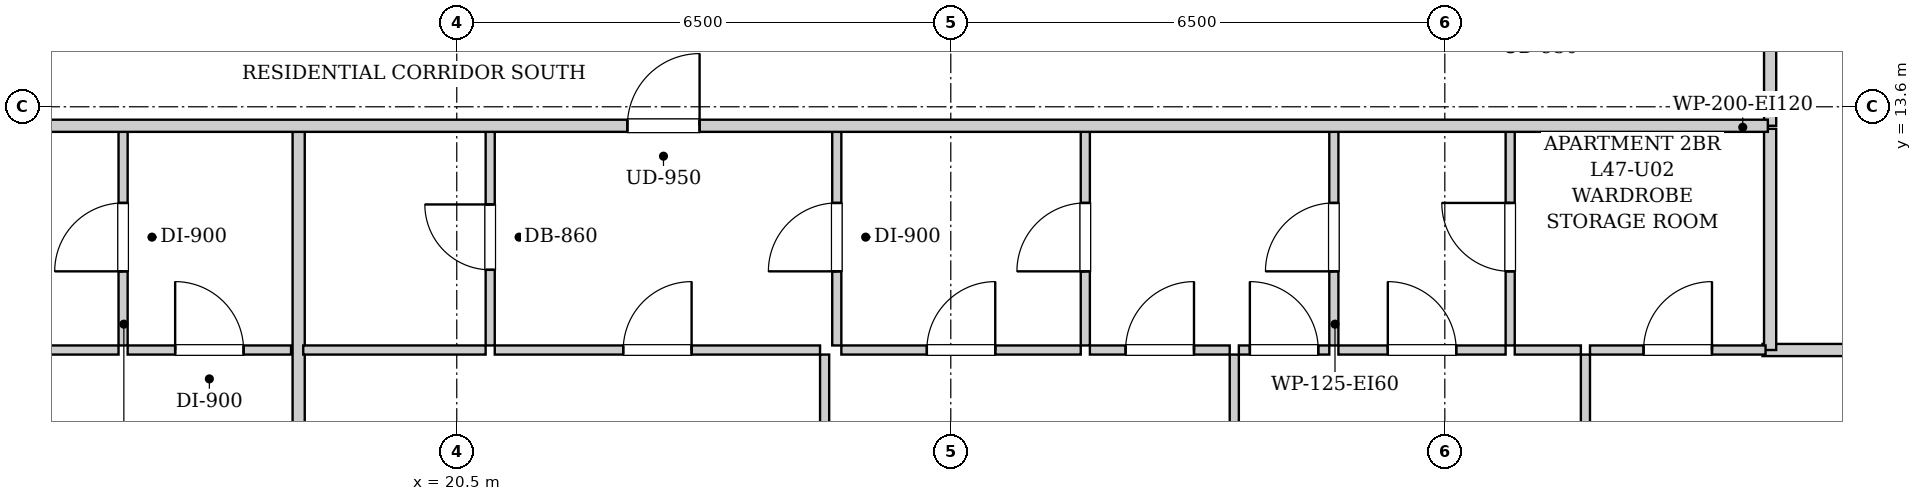
"""IFC4 building model, lengths in metres.
Left out: names, types, materials, properties, quantities, classifications, styles, units other than length and angle.
Written with IfcOpenShell. Run it as: python <this file> out.ifc"""

import sys

from ifc_helpers import new_model, si_unit, direction, frame, frame_2d, origin, place, context, subcontext, project, spatial, rectangle, extrude, element, fill, save


model = new_model("IFC4")
c1 = context("Model", 3, precision=1e-05, world=origin(), true_north=direction((0.0, 1.0)))
c2 = subcontext(c1, "Body", "Model", "MODEL_VIEW")
j1 = project(units=[si_unit("LENGTHUNIT", "METRE"), si_unit("PLANEANGLEUNIT", "RADIAN")], contexts=[c1])
p1 = place(None, origin())
s1 = spatial("IfcSite", under=j1, at=p1, CompositionType="ELEMENT")
p2 = place(p1, origin())
s2 = spatial("IfcBuilding", under=s1, at=p2, CompositionType="ELEMENT")
p3 = place(p2, frame((0.0, 0.0, 163.4)))
s3 = spatial("IfcBuildingStorey", under=s2, at=p3, CompositionType="ELEMENT", Elevation=163.4)
p4 = place(p3, frame((37.78, 13.35, 0.0), z_axis=(0.0, 0.0, 1.0), x_axis=(0.0, 1.0, 0.0)))
e1 = element("IfcWall", 1, at=p4, inside=s3, PredefinedType="PARTITIONING", context=c2, shape_type="SweptSolid", body=[
    extrude(rectangle(XDim=1.74, YDim=0.16, at=frame_2d((0.87, 0.0))), origin(), (0.0, 0.0, 1.0), 2.99),
])
p5 = place(p3, frame((16.11, 10.46, 0.0), z_axis=(0.0, 0.0, 1.0), x_axis=(0.0, 1.0, 0.0)))
e2 = element("IfcWall", 2, at=p5, inside=s3, PredefinedType="PARTITIONING", context=c2, shape_type="SweptSolid", body=[
    extrude(rectangle(XDim=2.85, YDim=0.12, at=frame_2d((1.425, 0.0))), origin(), (0.0, 0.0, 1.0), 2.99),
])
p6 = place(p5, frame((0.975, 0.0, 0.0)))
e3 = element("IfcOpeningElement", 3, at=p6, cuts=e2, PredefinedType="OPENING", context=c2, shape_type="SweptSolid", body=[
    extrude(rectangle(XDim=0.9, YDim=2.05, at=frame_2d((0.45, 1.025))), frame((0.0, 0.07, 0.0), z_axis=(0.0, -1.0, 0.0), x_axis=(1.0, 0.0, 0.0)), (0.0, 0.0, 1.0), 0.14),
])
p7 = place(p3, frame((12.6, 10.4, 0.0), z_axis=(0.0, 0.0, 1.0), x_axis=(1.0, 0.0, 0.0)))
e4 = element("IfcWall", 4, at=p7, inside=s3, PredefinedType="PARTITIONING", context=c2, shape_type="SweptSolid", body=[
    extrude(rectangle(XDim=3.45, YDim=0.12, at=frame_2d((1.725, 0.0))), origin(), (0.0, 0.0, 1.0), 2.99),
])
p8 = place(p7, frame((1.275, 0.0, 0.0)))
e5 = element("IfcOpeningElement", 5, at=p8, cuts=e4, PredefinedType="OPENING", context=c2, shape_type="SweptSolid", body=[
    extrude(rectangle(XDim=0.9, YDim=2.05, at=frame_2d((0.45, 1.025))), frame((0.0, 0.07, 0.0), z_axis=(0.0, -1.0, 0.0), x_axis=(1.0, 0.0, 0.0)), (0.0, 0.0, 1.0), 0.14),
])
p9 = place(p3, frame((16.17, 10.4, 0.0), z_axis=(0.0, 0.0, 1.0), x_axis=(1.0, 0.0, 0.0)))
e6 = element("IfcWall", 6, at=p9, inside=s3, PredefinedType="PARTITIONING", context=c2, shape_type="SweptSolid", body=[
    extrude(rectangle(XDim=2.15, YDim=0.12, at=frame_2d((1.075, 0.0))), origin(), (0.0, 0.0, 1.0), 2.99),
])
p10 = place(p9, frame((0.625, 0.0, 0.0)))
e7 = element("IfcOpeningElement", 7, at=p10, cuts=e6, PredefinedType="OPENING", context=c2, shape_type="SweptSolid", body=[
    extrude(rectangle(XDim=0.9, YDim=2.05, at=frame_2d((0.45, 1.025))), frame((0.0, 0.07, 0.0), z_axis=(0.0, -1.0, 0.0), x_axis=(1.0, 0.0, 0.0)), (0.0, 0.0, 1.0), 0.14),
])
p11 = place(p3, frame((37.68, 10.4, 0.0), z_axis=(0.0, 0.0, 1.0), x_axis=(1.0, 0.0, 0.0)))
e8 = element("IfcWall", 8, at=p11, inside=s3, PredefinedType="PARTITIONING", context=c2, shape_type="SweptSolid", body=[
    extrude(rectangle(XDim=2.34, YDim=0.16, at=frame_2d((1.17, 0.0))), origin(), (0.0, 0.0, 1.0), 2.99),
])
p12 = place(p3, frame((37.78, 10.4, 0.0), z_axis=(0.0, 0.0, 1.0), x_axis=(0.0, 1.0, 0.0)))
e9 = element("IfcWall", 9, at=p12, inside=s3, PredefinedType="PARTITIONING", context=c2, shape_type="SweptSolid", body=[
    extrude(rectangle(XDim=2.91, YDim=0.16, at=frame_2d((1.455, 0.0))), origin(), (0.0, 0.0, 1.0), 2.99),
])
p13 = place(p3, frame((18.42, 4.08, 0.0), z_axis=(0.0, 0.0, 1.0), x_axis=(0.0, 1.0, 0.0)))
e10 = element("IfcWall", 10, at=p13, inside=s3, PredefinedType="PARTITIONING", context=c2, shape_type="SweptSolid", body=[
    extrude(rectangle(XDim=9.23, YDim=0.16, at=frame_2d((4.615, 0.0))), origin(), (0.0, 0.0, 1.0), 2.99),
])
p14 = place(p3, frame((20.94, 10.46, 0.0), z_axis=(0.0, 0.0, 1.0), x_axis=(0.0, 1.0, 0.0)))
e11 = element("IfcWall", 11, at=p14, inside=s3, PredefinedType="PARTITIONING", context=c2, shape_type="SweptSolid", body=[
    extrude(rectangle(XDim=2.85, YDim=0.12, at=frame_2d((1.425, 0.0))), origin(), (0.0, 0.0, 1.0), 2.99),
])
p15 = place(p14, frame((0.995, 0.0, 0.0)))
e12 = element("IfcOpeningElement", 12, at=p15, cuts=e11, PredefinedType="OPENING", context=c2, shape_type="SweptSolid", body=[
    extrude(rectangle(XDim=0.86, YDim=2.05, at=frame_2d((0.43, 1.025))), frame((0.0, 0.07, 0.0), z_axis=(0.0, -1.0, 0.0), x_axis=(1.0, 0.0, 0.0)), (0.0, 0.0, 1.0), 0.14),
])
p16 = place(p3, frame((18.48, 10.4, 0.0), z_axis=(0.0, 0.0, 1.0), x_axis=(1.0, 0.0, 0.0)))
e13 = element("IfcWall", 13, at=p16, inside=s3, PredefinedType="PARTITIONING", context=c2, shape_type="SweptSolid", body=[
    extrude(rectangle(XDim=2.4, YDim=0.12, at=frame_2d((1.2, 0.0))), origin(), (0.0, 0.0, 1.0), 2.99),
])
p17 = place(p3, frame((25.5, 10.46, 0.0), z_axis=(0.0, 0.0, 1.0), x_axis=(0.0, 1.0, 0.0)))
e14 = element("IfcWall", 14, at=p17, inside=s3, PredefinedType="PARTITIONING", context=c2, shape_type="SweptSolid", body=[
    extrude(rectangle(XDim=2.85, YDim=0.12, at=frame_2d((1.425, 0.0))), origin(), (0.0, 0.0, 1.0), 2.99),
])
p18 = place(p17, frame((0.975, 0.0, 0.0)))
e15 = element("IfcOpeningElement", 15, at=p18, cuts=e14, PredefinedType="OPENING", context=c2, shape_type="SweptSolid", body=[
    extrude(rectangle(XDim=0.9, YDim=2.05, at=frame_2d((0.45, 1.025))), frame((0.0, 0.07, 0.0), z_axis=(0.0, -1.0, 0.0), x_axis=(1.0, 0.0, 0.0)), (0.0, 0.0, 1.0), 0.14),
])
p19 = place(p3, frame((21.0, 10.4, 0.0), z_axis=(0.0, 0.0, 1.0), x_axis=(1.0, 0.0, 0.0)))
e16 = element("IfcWall", 16, at=p19, inside=s3, PredefinedType="PARTITIONING", context=c2, shape_type="SweptSolid", body=[
    extrude(rectangle(XDim=4.28, YDim=0.12, at=frame_2d((2.14, 0.0))), origin(), (0.0, 0.0, 1.0), 2.99),
])
p20 = place(p19, frame((1.69, 0.0, 0.0)))
e17 = element("IfcOpeningElement", 17, at=p20, cuts=e16, PredefinedType="OPENING", context=c2, shape_type="SweptSolid", body=[
    extrude(rectangle(XDim=0.9, YDim=2.05, at=frame_2d((0.45, 1.025))), frame((0.0, 0.07, 0.0), z_axis=(0.0, -1.0, 0.0), x_axis=(1.0, 0.0, 0.0)), (0.0, 0.0, 1.0), 0.14),
])
p21 = place(p3, frame((28.77, 10.46, 0.0), z_axis=(0.0, 0.0, 1.0), x_axis=(0.0, 1.0, 0.0)))
e18 = element("IfcWall", 18, at=p21, inside=s3, PredefinedType="PARTITIONING", context=c2, shape_type="SweptSolid", body=[
    extrude(rectangle(XDim=2.85, YDim=0.12, at=frame_2d((1.425, 0.0))), origin(), (0.0, 0.0, 1.0), 2.99),
])
p22 = place(p21, frame((0.975, 0.0, 0.0)))
e19 = element("IfcOpeningElement", 19, at=p22, cuts=e18, PredefinedType="OPENING", context=c2, shape_type="SweptSolid", body=[
    extrude(rectangle(XDim=0.9, YDim=2.05, at=frame_2d((0.45, 1.025))), frame((0.0, 0.07, 0.0), z_axis=(0.0, -1.0, 0.0), x_axis=(1.0, 0.0, 0.0)), (0.0, 0.0, 1.0), 0.14),
])
p23 = place(p3, frame((25.56, 10.4, 0.0), z_axis=(0.0, 0.0, 1.0), x_axis=(1.0, 0.0, 0.0)))
e20 = element("IfcWall", 20, at=p23, inside=s3, PredefinedType="PARTITIONING", context=c2, shape_type="SweptSolid", body=[
    extrude(rectangle(XDim=3.15, YDim=0.12, at=frame_2d((1.575, 0.0))), origin(), (0.0, 0.0, 1.0), 2.99),
])
p24 = place(p23, frame((1.125, 0.0, 0.0)))
e21 = element("IfcOpeningElement", 21, at=p24, cuts=e20, PredefinedType="OPENING", context=c2, shape_type="SweptSolid", body=[
    extrude(rectangle(XDim=0.9, YDim=2.05, at=frame_2d((0.45, 1.025))), frame((0.0, 0.07, 0.0), z_axis=(0.0, -1.0, 0.0), x_axis=(1.0, 0.0, 0.0)), (0.0, 0.0, 1.0), 0.14),
])
p25 = place(p3, frame((32.04, 10.46, 0.0), z_axis=(0.0, 0.0, 1.0), x_axis=(0.0, 1.0, 0.0)))
e22 = element("IfcWall", 22, at=p25, inside=s3, PredefinedType="PARTITIONING", context=c2, shape_type="SweptSolid", body=[
    extrude(rectangle(XDim=2.85, YDim=0.12, at=frame_2d((1.425, 0.0))), origin(), (0.0, 0.0, 1.0), 2.99),
])
p26 = place(p25, frame((0.975, 0.0, 0.0)))
e23 = element("IfcOpeningElement", 23, at=p26, cuts=e22, PredefinedType="OPENING", context=c2, shape_type="SweptSolid", body=[
    extrude(rectangle(XDim=0.9, YDim=2.05, at=frame_2d((0.45, 1.025))), frame((0.0, 0.07, 0.0), z_axis=(0.0, -1.0, 0.0), x_axis=(1.0, 0.0, 0.0)), (0.0, 0.0, 1.0), 0.14),
])
p27 = place(p3, frame((28.83, 10.4, 0.0), z_axis=(0.0, 0.0, 1.0), x_axis=(1.0, 0.0, 0.0)))
e24 = element("IfcWall", 24, at=p27, inside=s3, PredefinedType="PARTITIONING", context=c2, shape_type="SweptSolid", body=[
    extrude(rectangle(XDim=1.84, YDim=0.12, at=frame_2d((0.92, 0.0))), origin(), (0.0, 0.0, 1.0), 2.99),
])
p28 = place(p27, frame((0.47, 0.0, 0.0)))
e25 = element("IfcOpeningElement", 25, at=p28, cuts=e24, PredefinedType="OPENING", context=c2, shape_type="SweptSolid", body=[
    extrude(rectangle(XDim=0.9, YDim=2.05, at=frame_2d((0.45, 1.025))), frame((0.0, 0.07, 0.0), z_axis=(0.0, -1.0, 0.0), x_axis=(1.0, 0.0, 0.0)), (0.0, 0.0, 1.0), 0.14),
])
p29 = place(p3, frame((30.79, 10.4, 0.0), z_axis=(0.0, 0.0, 1.0), x_axis=(1.0, 0.0, 0.0)))
e26 = element("IfcWall", 26, at=p29, inside=s3, PredefinedType="PARTITIONING", context=c2, shape_type="SweptSolid", body=[
    extrude(rectangle(XDim=1.19, YDim=0.12, at=frame_2d((0.595, 0.0))), origin(), (0.0, 0.0, 1.0), 2.99),
])
p30 = place(p29, frame((0.145, 0.0, 0.0)))
e27 = element("IfcOpeningElement", 27, at=p30, cuts=e26, PredefinedType="OPENING", context=c2, shape_type="SweptSolid", body=[
    extrude(rectangle(XDim=0.9, YDim=2.05, at=frame_2d((0.45, 1.025))), frame((0.0, 0.07, 0.0), z_axis=(0.0, -1.0, 0.0), x_axis=(1.0, 0.0, 0.0)), (0.0, 0.0, 1.0), 0.14),
])
p31 = place(p3, frame((34.36, 10.46, 0.0), z_axis=(0.0, 0.0, 1.0), x_axis=(0.0, 1.0, 0.0)))
e28 = element("IfcWall", 28, at=p31, inside=s3, PredefinedType="PARTITIONING", context=c2, shape_type="SweptSolid", body=[
    extrude(rectangle(XDim=2.85, YDim=0.12, at=frame_2d((1.425, 0.0))), origin(), (0.0, 0.0, 1.0), 2.99),
])
p32 = place(p31, frame((0.975, 0.0, 0.0)))
e29 = element("IfcOpeningElement", 29, at=p32, cuts=e28, PredefinedType="OPENING", context=c2, shape_type="SweptSolid", body=[
    extrude(rectangle(XDim=0.9, YDim=2.05, at=frame_2d((0.45, 1.025))), frame((0.0, 0.07, 0.0), z_axis=(0.0, -1.0, 0.0), x_axis=(1.0, 0.0, 0.0)), (0.0, 0.0, 1.0), 0.14),
])
p33 = place(p3, frame((32.1, 10.4, 0.0), z_axis=(0.0, 0.0, 1.0), x_axis=(1.0, 0.0, 0.0)))
e30 = element("IfcWall", 30, at=p33, inside=s3, PredefinedType="PARTITIONING", context=c2, shape_type="SweptSolid", body=[
    extrude(rectangle(XDim=2.2, YDim=0.12, at=frame_2d((1.1, 0.0))), origin(), (0.0, 0.0, 1.0), 2.99),
])
p34 = place(p33, frame((0.65, 0.0, 0.0)))
e31 = element("IfcOpeningElement", 31, at=p34, cuts=e30, PredefinedType="OPENING", context=c2, shape_type="SweptSolid", body=[
    extrude(rectangle(XDim=0.9, YDim=2.05, at=frame_2d((0.45, 1.025))), frame((0.0, 0.07, 0.0), z_axis=(0.0, -1.0, 0.0), x_axis=(1.0, 0.0, 0.0)), (0.0, 0.0, 1.0), 0.14),
])
p35 = place(p3, frame((34.42, 10.4, 0.0), z_axis=(0.0, 0.0, 1.0), x_axis=(1.0, 0.0, 0.0)))
e32 = element("IfcWall", 32, at=p35, inside=s3, PredefinedType="PARTITIONING", context=c2, shape_type="SweptSolid", body=[
    extrude(rectangle(XDim=0.87, YDim=0.12, at=frame_2d((0.435, 0.0))), origin(), (0.0, 0.0, 1.0), 2.99),
])
p36 = place(p3, frame((35.41, 10.4, 0.0), z_axis=(0.0, 0.0, 1.0), x_axis=(1.0, 0.0, 0.0)))
e33 = element("IfcWall", 33, at=p36, inside=s3, PredefinedType="PARTITIONING", context=c2, shape_type="SweptSolid", body=[
    extrude(rectangle(XDim=2.31, YDim=0.12, at=frame_2d((1.155, 0.0))), origin(), (0.0, 0.0, 1.0), 2.99),
])
p37 = place(p36, frame((0.705, 0.0, 0.0)))
e34 = element("IfcOpeningElement", 34, at=p37, cuts=e33, PredefinedType="OPENING", context=c2, shape_type="SweptSolid", body=[
    extrude(rectangle(XDim=0.9, YDim=2.05, at=frame_2d((0.45, 1.025))), frame((0.0, 0.07, 0.0), z_axis=(0.0, -1.0, 0.0), x_axis=(1.0, 0.0, 0.0)), (0.0, 0.0, 1.0), 0.14),
])
p38 = place(p3, frame((25.34, 4.08, 0.0), z_axis=(0.0, 0.0, 1.0), x_axis=(0.0, 1.0, 0.0)))
e35 = element("IfcWall", 35, at=p38, inside=s3, PredefinedType="PARTITIONING", context=c2, shape_type="SweptSolid", body=[
    extrude(rectangle(XDim=6.26, YDim=0.12, at=frame_2d((3.13, 0.0))), origin(), (0.0, 0.0, 1.0), 2.99),
])
p39 = place(p38, frame((2.665, 0.0, 0.0)))
e36 = element("IfcOpeningElement", 36, at=p39, cuts=e35, PredefinedType="OPENING", context=c2, shape_type="SweptSolid", body=[
    extrude(rectangle(XDim=0.9, YDim=2.05, at=frame_2d((0.45, 1.025))), frame((0.0, 0.07, 0.0), z_axis=(0.0, -1.0, 0.0), x_axis=(1.0, 0.0, 0.0)), (0.0, 0.0, 1.0), 0.14),
])
p40 = place(p3, frame((30.73, 4.08, 0.0), z_axis=(0.0, 0.0, 1.0), x_axis=(0.0, 1.0, 0.0)))
e37 = element("IfcWall", 37, at=p40, inside=s3, PredefinedType="PARTITIONING", context=c2, shape_type="SweptSolid", body=[
    extrude(rectangle(XDim=6.26, YDim=0.12, at=frame_2d((3.13, 0.0))), origin(), (0.0, 0.0, 1.0), 2.99),
])
p41 = place(p40, frame((2.665, 0.0, 0.0)))
e38 = element("IfcOpeningElement", 38, at=p41, cuts=e37, PredefinedType="OPENING", context=c2, shape_type="SweptSolid", body=[
    extrude(rectangle(XDim=0.9, YDim=2.05, at=frame_2d((0.45, 1.025))), frame((0.0, 0.07, 0.0), z_axis=(0.0, -1.0, 0.0), x_axis=(1.0, 0.0, 0.0)), (0.0, 0.0, 1.0), 0.14),
])
p42 = place(p3, frame((35.35, 4.08, 0.0), z_axis=(0.0, 0.0, 1.0), x_axis=(0.0, 1.0, 0.0)))
e39 = element("IfcWall", 39, at=p42, inside=s3, PredefinedType="PARTITIONING", context=c2, shape_type="SweptSolid", body=[
    extrude(rectangle(XDim=6.26, YDim=0.12, at=frame_2d((3.13, 0.0))), origin(), (0.0, 0.0, 1.0), 2.99),
])
p43 = place(p42, frame((2.665, 0.0, 0.0)))
e40 = element("IfcOpeningElement", 40, at=p43, cuts=e39, PredefinedType="OPENING", context=c2, shape_type="SweptSolid", body=[
    extrude(rectangle(XDim=0.9, YDim=2.05, at=frame_2d((0.45, 1.025))), frame((0.0, 0.07, 0.0), z_axis=(0.0, -1.0, 0.0), x_axis=(1.0, 0.0, 0.0)), (0.0, 0.0, 1.0), 0.14),
])
p44 = place(p3, frame((10.05, 13.35, 0.0), z_axis=(0.0, 0.0, 1.0), x_axis=(1.0, 0.0, 0.0)))
e41 = element("IfcWall", 41, at=p44, inside=s3, PredefinedType="PARTITIONING", context=c2, shape_type="SweptSolid", body=[
    extrude(rectangle(XDim=27.7, YDim=0.16, at=frame_2d((13.85, 0.0))), origin(), (0.0, 0.0, 1.0), 2.99),
])
p45 = place(p44, frame((3.8, 0.0, 0.0)))
e42 = element("IfcOpeningElement", 42, at=p45, cuts=e41, PredefinedType="OPENING", context=c2, shape_type="SweptSolid", body=[
    extrude(rectangle(XDim=0.95, YDim=2.1, at=frame_2d((0.475, 1.05))), frame((0.0, 0.09, 0.0), z_axis=(0.0, -1.0, 0.0), x_axis=(1.0, 0.0, 0.0)), (0.0, 0.0, 1.0), 0.18),
])
p46 = place(p44, frame((12.695, 0.0, 0.0)))
e43 = element("IfcOpeningElement", 43, at=p46, cuts=e41, PredefinedType="OPENING", context=c2, shape_type="SweptSolid", body=[
    extrude(rectangle(XDim=0.95, YDim=2.1, at=frame_2d((0.475, 1.05))), frame((0.0, 0.09, 0.0), z_axis=(0.0, -1.0, 0.0), x_axis=(1.0, 0.0, 0.0)), (0.0, 0.0, 1.0), 0.18),
])
p47 = place(p6, origin())
e44 = element("IfcDoor", 44, at=p47, inside=s3, OperationType="SINGLE_SWING_LEFT", PredefinedType="DOOR", context=c2, shape_type="SweptSolid", body=[
    extrude(rectangle(XDim=0.9, YDim=2.05, at=frame_2d((0.45, 1.025))), frame((0.0, 0.025, 0.0), z_axis=(0.0, -1.0, 0.0), x_axis=(1.0, 0.0, 0.0)), (0.0, 0.0, 1.0), 0.05),
])
fill(e3, e44)
p48 = place(p10, origin())
e45 = element("IfcDoor", 45, at=p48, inside=s3, OperationType="SINGLE_SWING_LEFT", PredefinedType="DOOR", context=c2, shape_type="SweptSolid", body=[
    extrude(rectangle(XDim=0.9, YDim=2.05, at=frame_2d((0.45, 1.025))), frame((0.0, 0.025, 0.0), z_axis=(0.0, -1.0, 0.0), x_axis=(1.0, 0.0, 0.0)), (0.0, 0.0, 1.0), 0.05),
])
fill(e7, e45)
p49 = place(p15, origin())
e46 = element("IfcDoor", 46, at=p49, inside=s3, OperationType="SINGLE_SWING_RIGHT", PredefinedType="DOOR", context=c2, shape_type="SweptSolid", body=[
    extrude(rectangle(XDim=0.86, YDim=2.05, at=frame_2d((0.43, 1.025))), frame((0.0, 0.025, 0.0), z_axis=(0.0, -1.0, 0.0), x_axis=(1.0, 0.0, 0.0)), (0.0, 0.0, 1.0), 0.05),
])
fill(e12, e46)
p50 = place(p18, origin())
e47 = element("IfcDoor", 47, at=p50, inside=s3, OperationType="SINGLE_SWING_LEFT", PredefinedType="DOOR", context=c2, shape_type="SweptSolid", body=[
    extrude(rectangle(XDim=0.9, YDim=2.05, at=frame_2d((0.45, 1.025))), frame((0.0, 0.025, 0.0), z_axis=(0.0, -1.0, 0.0), x_axis=(1.0, 0.0, 0.0)), (0.0, 0.0, 1.0), 0.05),
])
fill(e15, e47)
p51 = place(p20, origin())
e48 = element("IfcDoor", 48, at=p51, inside=s3, OperationType="SINGLE_SWING_RIGHT", PredefinedType="DOOR", context=c2, shape_type="SweptSolid", body=[
    extrude(rectangle(XDim=0.9, YDim=2.05, at=frame_2d((0.45, 1.025))), frame((0.0, 0.025, 0.0), z_axis=(0.0, -1.0, 0.0), x_axis=(1.0, 0.0, 0.0)), (0.0, 0.0, 1.0), 0.05),
])
fill(e17, e48)
p52 = place(p22, origin())
e49 = element("IfcDoor", 49, at=p52, inside=s3, OperationType="SINGLE_SWING_LEFT", PredefinedType="DOOR", context=c2, shape_type="SweptSolid", body=[
    extrude(rectangle(XDim=0.9, YDim=2.05, at=frame_2d((0.45, 1.025))), frame((0.0, 0.025, 0.0), z_axis=(0.0, -1.0, 0.0), x_axis=(1.0, 0.0, 0.0)), (0.0, 0.0, 1.0), 0.05),
])
fill(e19, e49)
p53 = place(p24, origin())
e50 = element("IfcDoor", 50, at=p53, inside=s3, OperationType="SINGLE_SWING_RIGHT", PredefinedType="DOOR", context=c2, shape_type="SweptSolid", body=[
    extrude(rectangle(XDim=0.9, YDim=2.05, at=frame_2d((0.45, 1.025))), frame((0.0, 0.025, 0.0), z_axis=(0.0, -1.0, 0.0), x_axis=(1.0, 0.0, 0.0)), (0.0, 0.0, 1.0), 0.05),
])
fill(e21, e50)
p54 = place(p26, origin())
e51 = element("IfcDoor", 51, at=p54, inside=s3, OperationType="SINGLE_SWING_LEFT", PredefinedType="DOOR", context=c2, shape_type="SweptSolid", body=[
    extrude(rectangle(XDim=0.9, YDim=2.05, at=frame_2d((0.45, 1.025))), frame((0.0, 0.025, 0.0), z_axis=(0.0, -1.0, 0.0), x_axis=(1.0, 0.0, 0.0)), (0.0, 0.0, 1.0), 0.05),
])
fill(e23, e51)
p55 = place(p28, origin())
e52 = element("IfcDoor", 52, at=p55, inside=s3, OperationType="SINGLE_SWING_RIGHT", PredefinedType="DOOR", context=c2, shape_type="SweptSolid", body=[
    extrude(rectangle(XDim=0.9, YDim=2.05, at=frame_2d((0.45, 1.025))), frame((0.0, 0.025, 0.0), z_axis=(0.0, -1.0, 0.0), x_axis=(1.0, 0.0, 0.0)), (0.0, 0.0, 1.0), 0.05),
])
fill(e25, e52)
p56 = place(p30, origin())
e53 = element("IfcDoor", 53, at=p56, inside=s3, OperationType="SINGLE_SWING_LEFT", PredefinedType="DOOR", context=c2, shape_type="SweptSolid", body=[
    extrude(rectangle(XDim=0.9, YDim=2.05, at=frame_2d((0.45, 1.025))), frame((0.0, 0.025, 0.0), z_axis=(0.0, -1.0, 0.0), x_axis=(1.0, 0.0, 0.0)), (0.0, 0.0, 1.0), 0.05),
])
fill(e27, e53)
p57 = place(p32, origin())
e54 = element("IfcDoor", 54, at=p57, inside=s3, OperationType="SINGLE_SWING_RIGHT", PredefinedType="DOOR", context=c2, shape_type="SweptSolid", body=[
    extrude(rectangle(XDim=0.9, YDim=2.05, at=frame_2d((0.45, 1.025))), frame((0.0, 0.025, 0.0), z_axis=(0.0, -1.0, 0.0), x_axis=(1.0, 0.0, 0.0)), (0.0, 0.0, 1.0), 0.05),
])
fill(e29, e54)
p58 = place(p34, origin())
e55 = element("IfcDoor", 55, at=p58, inside=s3, OperationType="SINGLE_SWING_LEFT", PredefinedType="DOOR", context=c2, shape_type="SweptSolid", body=[
    extrude(rectangle(XDim=0.9, YDim=2.05, at=frame_2d((0.45, 1.025))), frame((0.0, 0.025, 0.0), z_axis=(0.0, -1.0, 0.0), x_axis=(1.0, 0.0, 0.0)), (0.0, 0.0, 1.0), 0.05),
])
fill(e31, e55)
p59 = place(p37, origin())
e56 = element("IfcDoor", 56, at=p59, inside=s3, OperationType="SINGLE_SWING_RIGHT", PredefinedType="DOOR", context=c2, shape_type="SweptSolid", body=[
    extrude(rectangle(XDim=0.9, YDim=2.05, at=frame_2d((0.45, 1.025))), frame((0.0, 0.025, 0.0), z_axis=(0.0, -1.0, 0.0), x_axis=(1.0, 0.0, 0.0)), (0.0, 0.0, 1.0), 0.05),
])
fill(e34, e56)
p60 = place(p46, origin())
e57 = element("IfcDoor", 57, at=p60, inside=s3, OperationType="SINGLE_SWING_RIGHT", PredefinedType="DOOR", context=c2, shape_type="SweptSolid", body=[
    extrude(rectangle(XDim=0.95, YDim=2.1, at=frame_2d((0.475, 1.05))), frame((0.0, 0.025, 0.0), z_axis=(0.0, -1.0, 0.0), x_axis=(1.0, 0.0, 0.0)), (0.0, 0.0, 1.0), 0.05),
])
fill(e43, e57)
save(model, sys.argv[1])
